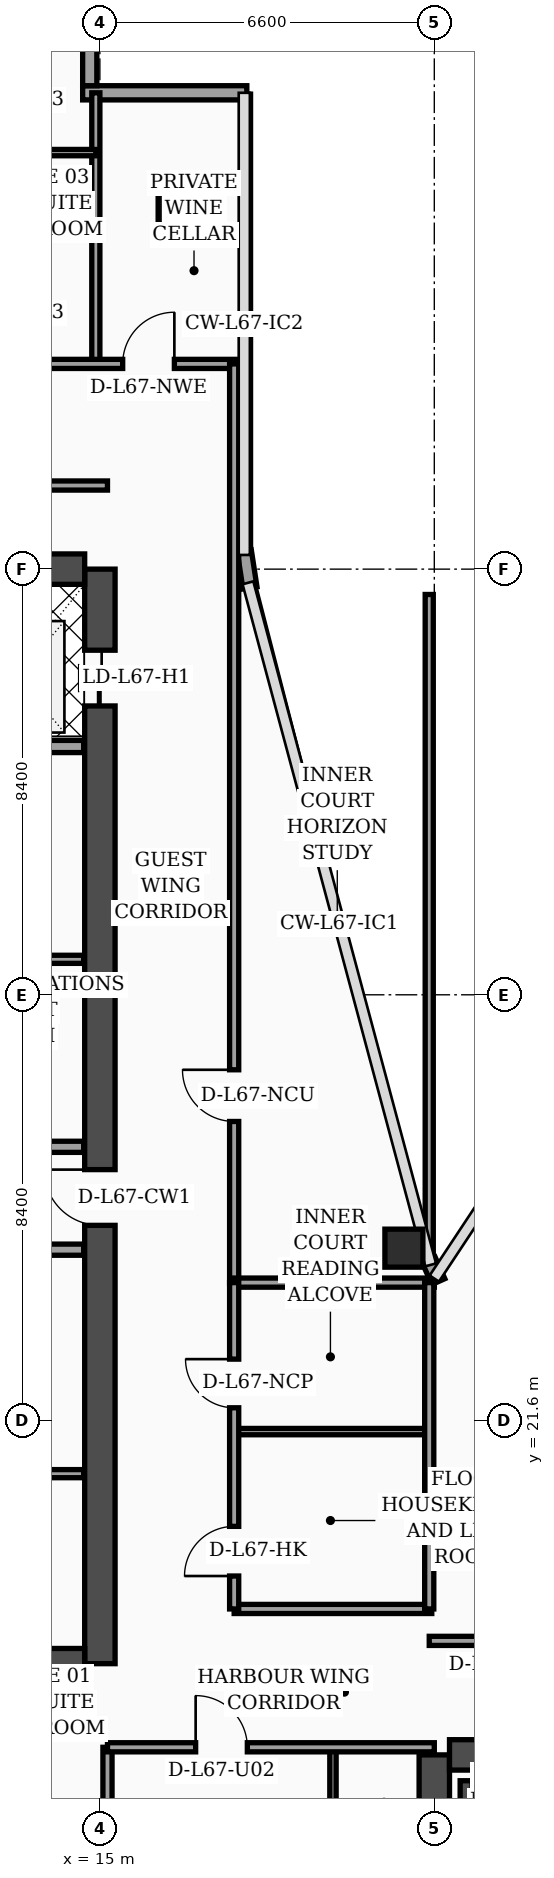
"""IFC4 building model, lengths in metres.
Left out: names, types, materials, properties, quantities, classifications, styles, units other than length and angle.
Written with IfcOpenShell. Run it as: python <this file> out.ifc"""

import sys

from ifc_helpers import new_model, si_unit, direction, frame, frame_2d, origin, origin_2d, place, context, subcontext, project, spatial, rectangle, hollow_rectangle, extrude, element, fill, save


model = new_model("IFC4")
c1 = context("Model", 3, precision=1e-05, world=origin(), true_north=direction((0.0, 1.0)))
c2 = subcontext(c1, "Body", "Model", "MODEL_VIEW")
j1 = project(units=[si_unit("LENGTHUNIT", "METRE"), si_unit("PLANEANGLEUNIT", "RADIAN")], contexts=[c1])
p1 = place(None, origin())
s1 = spatial("IfcSite", under=j1, at=p1, CompositionType="ELEMENT")
p2 = place(p1, origin())
s2 = spatial("IfcBuilding", under=s1, at=p2, CompositionType="ELEMENT")
p3 = place(p2, frame((0.0, 0.0, 271.1)))
s3 = spatial("IfcBuildingStorey", under=s2, at=p3, CompositionType="ELEMENT", Elevation=271.1)
p4 = place(p3, frame((15.0, 16.8, 0.0), z_axis=(0.0, 0.0, 1.0), x_axis=(0.0, 1.0, 0.0)))
e1 = element("IfcWall", 1, at=p4, inside=s3, PredefinedType="SHEAR", context=c2, shape_type="SweptSolid", body=[
    extrude(rectangle(XDim=21.6, YDim=0.6, at=frame_2d((10.8, 0.0))), origin(), (0.0, 0.0, 1.0), 3.56),
])
p5 = place(p4, frame((8.65, 0.0, 0.0)))
e2 = element("IfcOpeningElement", 2, at=p5, cuts=e1, PredefinedType="OPENING", context=c2, shape_type="SweptSolid", body=[
    extrude(rectangle(XDim=1.1, YDim=2.2, at=frame_2d((0.55, 1.1))), frame((0.0, 0.31, 0.0), z_axis=(0.0, -1.0, 0.0), x_axis=(1.0, 0.0, 0.0)), (0.0, 0.0, 1.0), 0.62),
])
p6 = place(p4, frame((18.9, 0.0, 0.0)))
e3 = element("IfcOpeningElement", 3, at=p6, cuts=e1, PredefinedType="OPENING", context=c2, shape_type="SweptSolid", body=[
    extrude(rectangle(XDim=1.1, YDim=2.2, at=frame_2d((0.55, 1.1))), frame((0.0, 0.31, 0.0), z_axis=(0.0, -1.0, 0.0), x_axis=(1.0, 0.0, 0.0)), (0.0, 0.0, 1.0), 0.62),
])
p7 = place(p3, frame((4.5, 38.4, 0.0), z_axis=(0.0, 0.0, 1.0), x_axis=(1.0, 0.0, 0.0)))
e4 = element("IfcWall", 4, at=p7, inside=s3, PredefinedType="SHEAR", context=c2, shape_type="SweptSolid", body=[
    extrude(rectangle(XDim=10.2, YDim=0.6, at=frame_2d((5.1, 0.0))), origin(), (0.0, 0.0, 1.0), 3.56),
])
p8 = place(p7, frame((5.8, 0.0, 0.0)))
e5 = element("IfcOpeningElement", 5, at=p8, cuts=e4, PredefinedType="OPENING", context=c2, shape_type="SweptSolid", body=[
    extrude(rectangle(XDim=1.1, YDim=2.2, at=frame_2d((0.55, 1.1))), frame((0.0, 0.31, 0.0), z_axis=(0.0, -1.0, 0.0), x_axis=(1.0, 0.0, 0.0)), (0.0, 0.0, 1.0), 0.62),
])
p9 = place(p3, frame((4.5, 16.8, 0.0), z_axis=(0.0, 0.0, 1.0), x_axis=(1.0, 0.0, 0.0)))
e6 = element("IfcWall", 6, at=p9, inside=s3, PredefinedType="SHEAR", context=c2, shape_type="SweptSolid", body=[
    extrude(rectangle(XDim=10.2, YDim=0.6, at=frame_2d((5.1, 0.0))), origin(), (0.0, 0.0, 1.0), 3.56),
])
p10 = place(p3, frame((21.6, 4.6, 0.0), z_axis=(0.0, 0.0, 1.0), x_axis=(0.0, 1.0, 0.0)))
e7 = element("IfcWall", 7, at=p10, inside=s3, PredefinedType="SHEAR", context=c2, shape_type="SweptSolid", body=[
    extrude(rectangle(XDim=10.4, YDim=0.6, at=frame_2d((5.2, 0.0))), origin(), (0.0, 0.0, 1.0), 3.56),
])
p11 = place(p3, frame((21.9, 15.0, 0.0), z_axis=(0.0, 0.0, 1.0), x_axis=(1.0, 0.0, 0.0)))
e8 = element("IfcWall", 8, at=p11, inside=s3, PredefinedType="SHEAR", context=c2, shape_type="SweptSolid", body=[
    extrude(rectangle(XDim=10.2, YDim=0.6, at=frame_2d((5.1, 0.0))), origin(), (0.0, 0.0, 1.0), 3.56),
])
p12 = place(p11, frame((5.0, 0.0, 0.0)))
e9 = element("IfcOpeningElement", 9, at=p12, cuts=e8, PredefinedType="OPENING", context=c2, shape_type="SweptSolid", body=[
    extrude(rectangle(XDim=1.1, YDim=2.2, at=frame_2d((0.55, 1.1))), frame((0.0, 0.31, 0.0), z_axis=(0.0, -1.0, 0.0), x_axis=(1.0, 0.0, 0.0)), (0.0, 0.0, 1.0), 0.62),
])
p13 = place(p3, frame((22.23, 4.9, 0.0), z_axis=(0.0, 0.0, 1.0), x_axis=(0.0, 1.0, 0.0)))
e10 = element("IfcWall", 10, at=p13, inside=s3, PredefinedType="SOLIDWALL", context=c2, shape_type="SweptSolid", body=[
    extrude(rectangle(XDim=9.59, YDim=0.24, at=frame_2d((4.795, 0.0))), origin(), (0.0, 0.0, 1.0), 3.56),
])
p14 = place(p3, frame((22.35, 14.37, 0.0), z_axis=(0.0, 0.0, 1.0), x_axis=(1.0, 0.0, 0.0)))
e11 = element("IfcWall", 11, at=p14, inside=s3, PredefinedType="SOLIDWALL", context=c2, shape_type="SweptSolid", body=[
    extrude(rectangle(XDim=3.1, YDim=0.24, at=frame_2d((1.55, 0.0))), origin(), (0.0, 0.0, 1.0), 3.56),
])
p15 = place(p3, frame((16.55, 45.6, 0.0), z_axis=(0.0, 0.0, 1.0), x_axis=(1.0, 0.0, 0.0)))
e12 = element("IfcColumn", 12, at=p15, inside=s3, PredefinedType="COLUMN", context=c2, shape_type="SweptSolid", body=[
    extrude(rectangle(XDim=0.8, YDim=0.8, at=origin_2d()), origin(), (0.0, 0.0, 1.0), 3.56),
])
p16 = place(p3, frame((21.0, 25.0, 0.0), z_axis=(0.0, 0.0, 1.0), x_axis=(1.0, 0.0, 0.0)))
e13 = element("IfcColumn", 13, at=p16, inside=s3, PredefinedType="COLUMN", context=c2, shape_type="SweptSolid", body=[
    extrude(hollow_rectangle(XDim=0.75, YDim=0.75, WallThickness=0.032, at=origin_2d()), origin(), (0.0, 0.0, 1.0), 3.56),
])
p17 = place(p3, frame((21.68, 24.34, 0.0), z_axis=(0.0, 0.0, 1.0), x_axis=(-0.40758134973, 0.913168901875, 0.0)))
e14 = element("IfcWall", 14, at=p17, inside=s3, PredefinedType="SOLIDWALL", context=c2, shape_type="SweptSolid", body=[
    extrude(rectangle(XDim=0.471, YDim=0.28, at=frame_2d((0.235, 0.0))), origin(), (0.0, 0.0, 1.0), 3.56),
])
p18 = place(p3, frame((17.962, 38.03, 0.0), z_axis=(0.0, 0.0, 1.0), x_axis=(-0.15141125477, 0.988470855377, 0.0)))
e15 = element("IfcWall", 15, at=p18, inside=s3, PredefinedType="SOLIDWALL", context=c2, shape_type="SweptSolid", body=[
    extrude(rectangle(XDim=0.739, YDim=0.28, at=frame_2d((0.369, 0.0))), origin(), (0.0, 0.0, 1.0), 3.56),
])
p19 = place(p3, frame((17.9, 47.8, 0.0), z_axis=(0.0, 0.0, 1.0), x_axis=(-1.0, 0.0, 0.0)))
e16 = element("IfcWall", 16, at=p19, inside=s3, PredefinedType="SOLIDWALL", context=c2, shape_type="SweptSolid", body=[
    extrude(rectangle(XDim=3.24, YDim=0.28, at=frame_2d((1.62, 0.0))), origin(), (0.0, 0.0, 1.0), 3.56),
])
p20 = place(p3, frame((14.8, 47.94, 0.0), z_axis=(0.0, 0.0, 1.0), x_axis=(0.0, 1.0, 0.0)))
e17 = element("IfcWall", 17, at=p20, inside=s3, PredefinedType="SOLIDWALL", context=c2, shape_type="SweptSolid", body=[
    extrude(rectangle(XDim=2.94, YDim=0.28, at=frame_2d((1.47, 0.0))), origin(), (0.0, 0.0, 1.0), 3.56),
])
p21 = place(p3, frame((9.68, 20.55, 0.0), z_axis=(0.0, 0.0, 1.0), x_axis=(1.0, 0.0, 0.0)))
e18 = element("IfcWall", 18, at=p21, inside=s3, PredefinedType="PARTITIONING", context=c2, shape_type="SweptSolid", body=[
    extrude(rectangle(XDim=5.0, YDim=0.16, at=frame_2d((2.5, 0.0))), origin(), (0.0, 0.0, 1.0), 3.56),
])
p22 = place(p21, frame((1.1, 0.0, 0.0)))
e19 = element("IfcOpeningElement", 19, at=p22, cuts=e18, PredefinedType="OPENING", context=c2, shape_type="SweptSolid", body=[
    extrude(rectangle(XDim=0.98, YDim=2.15, at=frame_2d((0.49, 1.075))), frame((0.0, 0.09, 0.0), z_axis=(0.0, -1.0, 0.0), x_axis=(1.0, 0.0, 0.0)), (0.0, 0.0, 1.0), 0.18),
])
p23 = place(p3, frame((9.68, 24.97, 0.0), z_axis=(0.0, 0.0, 1.0), x_axis=(1.0, 0.0, 0.0)))
e20 = element("IfcWall", 20, at=p23, inside=s3, PredefinedType="SOLIDWALL", context=c2, shape_type="SweptSolid", body=[
    extrude(rectangle(XDim=5.0, YDim=0.22, at=frame_2d((2.5, 0.0))), origin(), (0.0, 0.0, 1.0), 2.99),
])
p24 = place(p23, frame((0.9, 0.0, 0.0)))
e21 = element("IfcOpeningElement", 21, at=p24, cuts=e20, PredefinedType="OPENING", context=c2, shape_type="SweptSolid", body=[
    extrude(rectangle(XDim=0.98, YDim=2.15, at=frame_2d((0.49, 1.075))), frame((0.0, 0.12, 0.0), z_axis=(0.0, -1.0, 0.0), x_axis=(1.0, 0.0, 0.0)), (0.0, 0.0, 1.0), 0.24),
])
p25 = place(p3, frame((12.25, 27.0, 0.0), z_axis=(0.0, 0.0, 1.0), x_axis=(1.0, 0.0, 0.0)))
e22 = element("IfcWall", 22, at=p25, inside=s3, PredefinedType="SOLIDWALL", context=c2, shape_type="SweptSolid", body=[
    extrude(rectangle(XDim=2.43, YDim=0.22, at=frame_2d((1.215, 0.0))), origin(), (0.0, 0.0, 1.0), 3.56),
])
p26 = place(p3, frame((12.25, 30.7, 0.0), z_axis=(0.0, 0.0, 1.0), x_axis=(1.0, 0.0, 0.0)))
e23 = element("IfcWall", 23, at=p26, inside=s3, PredefinedType="PARTITIONING", context=c2, shape_type="SweptSolid", body=[
    extrude(rectangle(XDim=2.43, YDim=0.16, at=frame_2d((1.215, 0.0))), origin(), (0.0, 0.0, 1.0), 3.56),
])
p27 = place(p26, frame((0.55, 0.0, 0.0)))
e24 = element("IfcOpeningElement", 24, at=p27, cuts=e23, PredefinedType="OPENING", context=c2, shape_type="SweptSolid", body=[
    extrude(rectangle(XDim=0.98, YDim=2.15, at=frame_2d((0.49, 1.075))), frame((0.0, 0.09, 0.0), z_axis=(0.0, -1.0, 0.0), x_axis=(1.0, 0.0, 0.0)), (0.0, 0.0, 1.0), 0.18),
])
p28 = place(p3, frame((9.66, 34.9, 0.0), z_axis=(0.0, 0.0, 1.0), x_axis=(1.0, 0.0, 0.0)))
e25 = element("IfcWall", 25, at=p28, inside=s3, PredefinedType="SOLIDWALL", context=c2, shape_type="SweptSolid", body=[
    extrude(rectangle(XDim=5.02, YDim=0.24, at=frame_2d((2.51, 0.0))), origin(), (0.0, 0.0, 1.0), 3.56),
])
p29 = place(p3, frame((15.15, 2.44, 0.0), z_axis=(0.0, 0.0, 1.0), x_axis=(0.0, 1.0, 0.0)))
e26 = element("IfcWall", 26, at=p29, inside=s3, PredefinedType="PARTITIONING", context=c2, shape_type="SweptSolid", body=[
    extrude(rectangle(XDim=12.71, YDim=0.18, at=frame_2d((6.355, 0.0))), origin(), (0.0, 0.0, 1.0), 3.09),
])
p30 = place(p3, frame((19.6, 2.44, 0.0), z_axis=(0.0, 0.0, 1.0), x_axis=(0.0, 1.0, 0.0)))
e27 = element("IfcWall", 27, at=p30, inside=s3, PredefinedType="PARTITIONING", context=c2, shape_type="SweptSolid", body=[
    extrude(rectangle(XDim=12.71, YDim=0.125, at=frame_2d((6.355, 0.0))), origin(), (0.0, 0.0, 1.0), 2.59),
])
p31 = place(p30, frame((4.34, 0.0, 0.0)))
e28 = element("IfcOpeningElement", 28, at=p31, cuts=e27, PredefinedType="OPENING", context=c2, shape_type="SweptSolid", body=[
    extrude(rectangle(XDim=0.96, YDim=2.2, at=frame_2d((0.48, 1.1))), frame((0.0, 0.073, 0.0), z_axis=(0.0, -1.0, 0.0), x_axis=(1.0, 0.0, 0.0)), (0.0, 0.0, 1.0), 0.145),
])
p32 = place(p30, frame((10.18, 0.0, 0.0)))
e29 = element("IfcOpeningElement", 29, at=p32, cuts=e27, PredefinedType="OPENING", context=c2, shape_type="SweptSolid", body=[
    extrude(rectangle(XDim=0.9, YDim=2.15, at=frame_2d((0.45, 1.075))), frame((0.0, 0.073, 0.0), z_axis=(0.0, -1.0, 0.0), x_axis=(1.0, 0.0, 0.0)), (0.0, 0.0, 1.0), 0.145),
])
p33 = place(p3, frame((15.15, 15.15, 0.0), z_axis=(0.0, 0.0, 1.0), x_axis=(1.0, 0.0, 0.0)))
e30 = element("IfcWall", 30, at=p33, inside=s3, PredefinedType="PARTITIONING", context=c2, shape_type="SweptSolid", body=[
    extrude(rectangle(XDim=6.45, YDim=0.18, at=frame_2d((3.225, 0.0))), origin(), (0.0, 0.0, 1.0), 2.59),
])
p34 = place(p33, frame((1.74, 0.0, 0.0)))
e31 = element("IfcOpeningElement", 31, at=p34, cuts=e30, PredefinedType="OPENING", context=c2, shape_type="SweptSolid", body=[
    extrude(rectangle(XDim=1.02, YDim=2.2, at=frame_2d((0.51, 1.1))), frame((0.0, 0.1, 0.0), z_axis=(0.0, -1.0, 0.0), x_axis=(1.0, 0.0, 0.0)), (0.0, 0.0, 1.0), 0.2),
])
p35 = place(p3, frame((14.92, 42.45, 0.0), z_axis=(0.0, 0.0, 1.0), x_axis=(0.0, 1.0, 0.0)))
e32 = element("IfcWall", 32, at=p35, inside=s3, PredefinedType="PARTITIONING", context=c2, shape_type="SweptSolid", body=[
    extrude(rectangle(XDim=5.35, YDim=0.16, at=frame_2d((2.675, 0.0))), origin(), (0.0, 0.0, 1.0), 3.09),
])
p36 = place(p3, frame((12.79, 46.62, 0.0), z_axis=(0.0, 0.0, 1.0), x_axis=(1.0, 0.0, 0.0)))
e33 = element("IfcWall", 33, at=p36, inside=s3, PredefinedType="PARTITIONING", context=c2, shape_type="SweptSolid", body=[
    extrude(rectangle(XDim=2.13, YDim=0.125, at=frame_2d((1.065, 0.0))), origin(), (0.0, 0.0, 1.0), 3.09),
])
p37 = place(p3, frame((0.08, 42.45, 0.0), z_axis=(0.0, 0.0, 1.0), x_axis=(1.0, 0.0, 0.0)))
e34 = element("IfcWall", 34, at=p37, inside=s3, PredefinedType="PARTITIONING", context=c2, shape_type="SweptSolid", body=[
    extrude(rectangle(XDim=17.77, YDim=0.18, at=frame_2d((8.885, 0.0))), origin(), (0.0, 0.0, 1.0), 2.99),
])
p38 = place(p37, frame((0.9, 0.0, 0.0)))
e35 = element("IfcOpeningElement", 35, at=p38, cuts=e34, PredefinedType="OPENING", context=c2, shape_type="SweptSolid", body=[
    extrude(rectangle(XDim=1.02, YDim=2.2, at=frame_2d((0.51, 1.1))), frame((0.0, 0.1, 0.0), z_axis=(0.0, -1.0, 0.0), x_axis=(1.0, 0.0, 0.0)), (0.0, 0.0, 1.0), 0.2),
])
p39 = place(p37, frame((7.38, 0.0, 0.0)))
e36 = element("IfcOpeningElement", 36, at=p39, cuts=e34, PredefinedType="OPENING", context=c2, shape_type="SweptSolid", body=[
    extrude(rectangle(XDim=1.02, YDim=2.2, at=frame_2d((0.51, 1.1))), frame((0.0, 0.1, 0.0), z_axis=(0.0, -1.0, 0.0), x_axis=(1.0, 0.0, 0.0)), (0.0, 0.0, 1.0), 0.2),
])
p40 = place(p37, frame((15.37, 0.0, 0.0)))
e37 = element("IfcOpeningElement", 37, at=p40, cuts=e34, PredefinedType="OPENING", context=c2, shape_type="SweptSolid", body=[
    extrude(rectangle(XDim=1.02, YDim=2.2, at=frame_2d((0.51, 1.1))), frame((0.0, 0.1, 0.0), z_axis=(0.0, -1.0, 0.0), x_axis=(1.0, 0.0, 0.0)), (0.0, 0.0, 1.0), 0.2),
])
p41 = place(p3, frame((17.65, 24.3, 0.0), z_axis=(0.0, 0.0, 1.0), x_axis=(0.0, 1.0, 0.0)))
e38 = element("IfcWall", 38, at=p41, inside=s3, PredefinedType="PARTITIONING", context=c2, shape_type="SweptSolid", body=[
    extrude(rectangle(XDim=18.15, YDim=0.18, at=frame_2d((9.075, 0.0))), origin(), (0.0, 0.0, 1.0), 2.99),
])
p42 = place(p41, frame((3.2, 0.0, 0.0)))
e39 = element("IfcOpeningElement", 39, at=p42, cuts=e38, PredefinedType="OPENING", context=c2, shape_type="SweptSolid", body=[
    extrude(rectangle(XDim=1.02, YDim=2.2, at=frame_2d((0.51, 1.1))), frame((0.0, 0.1, 0.0), z_axis=(0.0, -1.0, 0.0), x_axis=(1.0, 0.0, 0.0)), (0.0, 0.0, 1.0), 0.2),
])
p43 = place(p3, frame((3.88, 40.05, 0.0), z_axis=(0.0, 0.0, 1.0), x_axis=(1.0, 0.0, 0.0)))
e40 = element("IfcWall", 40, at=p43, inside=s3, PredefinedType="PARTITIONING", context=c2, shape_type="SweptSolid", body=[
    extrude(rectangle(XDim=11.27, YDim=0.18, at=frame_2d((5.635, 0.0))), origin(), (0.0, 0.0, 1.0), 2.99),
])
p44 = place(p3, frame((17.65, 17.88, 0.0), z_axis=(0.0, 0.0, 1.0), x_axis=(1.0, 0.0, 0.0)))
e41 = element("IfcWall", 41, at=p44, inside=s3, PredefinedType="PARTITIONING", context=c2, shape_type="SweptSolid", body=[
    extrude(rectangle(XDim=3.9, YDim=0.18, at=frame_2d((1.95, 0.0))), origin(), (0.0, 0.0, 1.0), 3.09),
])
p45 = place(p3, frame((17.65, 21.38, 0.0), z_axis=(0.0, 0.0, 1.0), x_axis=(1.0, 0.0, 0.0)))
e42 = element("IfcWall", 42, at=p45, inside=s3, PredefinedType="PARTITIONING", context=c2, shape_type="SweptSolid", body=[
    extrude(rectangle(XDim=3.9, YDim=0.125, at=frame_2d((1.95, 0.0))), origin(), (0.0, 0.0, 1.0), 3.56),
])
p46 = place(p3, frame((17.65, 24.32, 0.0), z_axis=(0.0, 0.0, 1.0), x_axis=(1.0, 0.0, 0.0)))
e43 = element("IfcWall", 43, at=p46, inside=s3, PredefinedType="PARTITIONING", context=c2, shape_type="SweptSolid", body=[
    extrude(rectangle(XDim=3.95, YDim=0.18, at=frame_2d((1.975, 0.0))), origin(), (0.0, 0.0, 1.0), 3.56),
])
p47 = place(p3, frame((21.5, 17.88, 0.0), z_axis=(0.0, 0.0, 1.0), x_axis=(0.0, 1.0, 0.0)))
e44 = element("IfcWall", 44, at=p47, inside=s3, PredefinedType="PARTITIONING", context=c2, shape_type="SweptSolid", body=[
    extrude(rectangle(XDim=6.44, YDim=0.18, at=frame_2d((3.22, 0.0))), origin(), (0.0, 0.0, 1.0), 3.09),
])
p48 = place(p3, frame((17.65, 17.88, 0.0), z_axis=(0.0, 0.0, 1.0), x_axis=(0.0, 1.0, 0.0)))
e45 = element("IfcWall", 45, at=p48, inside=s3, PredefinedType="PARTITIONING", context=c2, shape_type="SweptSolid", body=[
    extrude(rectangle(XDim=6.44, YDim=0.18, at=frame_2d((3.22, 0.0))), origin(), (0.0, 0.0, 1.0), 3.09),
])
p49 = place(p48, frame((0.65, 0.0, 0.0)))
e46 = element("IfcOpeningElement", 46, at=p49, cuts=e45, PredefinedType="OPENING", context=c2, shape_type="SweptSolid", body=[
    extrude(rectangle(XDim=0.98, YDim=2.15, at=frame_2d((0.49, 1.075))), frame((0.0, 0.1, 0.0), z_axis=(0.0, -1.0, 0.0), x_axis=(1.0, 0.0, 0.0)), (0.0, 0.0, 1.0), 0.2),
])
p50 = place(p48, frame((3.97, 0.0, 0.0)))
e47 = element("IfcOpeningElement", 47, at=p50, cuts=e45, PredefinedType="OPENING", context=c2, shape_type="SweptSolid", body=[
    extrude(rectangle(XDim=0.96, YDim=2.2, at=frame_2d((0.48, 1.1))), frame((0.0, 0.1, 0.0), z_axis=(0.0, -1.0, 0.0), x_axis=(1.0, 0.0, 0.0)), (0.0, 0.0, 1.0), 0.2),
])
p51 = place(p3, frame((21.5, 24.85, 0.0), z_axis=(0.0, 0.0, 1.0), x_axis=(0.0, 1.0, 0.0)))
e48 = element("IfcWall", 48, at=p51, inside=s3, PredefinedType="PARTITIONING", context=c2, shape_type="SweptSolid", body=[
    extrude(rectangle(XDim=13.05, YDim=0.16, at=frame_2d((6.525, 0.0))), origin(), (0.0, 0.0, 1.0), 2.99),
])
p52 = place(p3, frame((21.5, 17.25, 0.0), z_axis=(0.0, 0.0, 1.0), x_axis=(1.0, 0.0, 0.0)))
e49 = element("IfcWall", 49, at=p52, inside=s3, PredefinedType="PARTITIONING", context=c2, shape_type="SweptSolid", body=[
    extrude(rectangle(XDim=6.9, YDim=0.18, at=frame_2d((3.45, 0.0))), origin(), (0.0, 0.0, 1.0), 3.56),
])
p53 = place(p52, frame((0.95, 0.0, 0.0)))
e50 = element("IfcOpeningElement", 50, at=p53, cuts=e49, PredefinedType="OPENING", context=c2, shape_type="SweptSolid", body=[
    extrude(rectangle(XDim=1.02, YDim=2.2, at=frame_2d((0.51, 1.1))), frame((0.0, 0.1, 0.0), z_axis=(0.0, -1.0, 0.0), x_axis=(1.0, 0.0, 0.0)), (0.0, 0.0, 1.0), 0.2),
])
p54 = place(p34, origin())
e51 = element("IfcDoor", 51, at=p54, inside=s3, OperationType="SINGLE_SWING_LEFT", PredefinedType="DOOR", context=c2, shape_type="SweptSolid", body=[
    extrude(rectangle(XDim=1.02, YDim=2.2, at=frame_2d((0.51, 1.1))), frame((0.0, 0.025, 0.0), z_axis=(0.0, -1.0, 0.0), x_axis=(1.0, 0.0, 0.0)), (0.0, 0.0, 1.0), 0.05),
])
fill(e31, e51)
p55 = place(p40, origin())
e52 = element("IfcDoor", 52, at=p55, inside=s3, OperationType="SINGLE_SWING_RIGHT", PredefinedType="DOOR", context=c2, shape_type="SweptSolid", body=[
    extrude(rectangle(XDim=1.02, YDim=2.2, at=frame_2d((0.51, 1.1))), frame((0.0, 0.025, 0.0), z_axis=(0.0, -1.0, 0.0), x_axis=(1.0, 0.0, 0.0)), (0.0, 0.0, 1.0), 0.05),
])
fill(e37, e52)
p56 = place(p42, origin())
e53 = element("IfcDoor", 53, at=p56, inside=s3, OperationType="SINGLE_SWING_RIGHT", PredefinedType="DOOR", context=c2, shape_type="SweptSolid", body=[
    extrude(rectangle(XDim=1.02, YDim=2.2, at=frame_2d((0.51, 1.1))), frame((0.0, 0.025, 0.0), z_axis=(0.0, -1.0, 0.0), x_axis=(1.0, 0.0, 0.0)), (0.0, 0.0, 1.0), 0.05),
])
fill(e39, e53)
p57 = place(p49, origin())
e54 = element("IfcDoor", 54, at=p57, inside=s3, OperationType="SINGLE_SWING_LEFT", PredefinedType="DOOR", context=c2, shape_type="SweptSolid", body=[
    extrude(rectangle(XDim=0.98, YDim=2.15, at=frame_2d((0.49, 1.075))), frame((0.0, 0.025, 0.0), z_axis=(0.0, -1.0, 0.0), x_axis=(1.0, 0.0, 0.0)), (0.0, 0.0, 1.0), 0.05),
])
fill(e46, e54)
p58 = place(p50, origin())
e55 = element("IfcDoor", 55, at=p58, inside=s3, OperationType="SINGLE_SWING_RIGHT", PredefinedType="DOOR", context=c2, shape_type="SweptSolid", body=[
    extrude(rectangle(XDim=0.96, YDim=2.2, at=frame_2d((0.48, 1.1))), frame((0.0, 0.025, 0.0), z_axis=(0.0, -1.0, 0.0), x_axis=(1.0, 0.0, 0.0)), (0.0, 0.0, 1.0), 0.05),
])
fill(e47, e55)
p59 = place(p5, origin())
e56 = element("IfcDoor", 56, at=p59, inside=s3, OperationType="SINGLE_SWING_RIGHT", PredefinedType="DOOR", context=c2, shape_type="SweptSolid", body=[
    extrude(rectangle(XDim=1.1, YDim=2.2, at=frame_2d((0.55, 1.1))), frame((0.0, 0.025, 0.0), z_axis=(0.0, -1.0, 0.0), x_axis=(1.0, 0.0, 0.0)), (0.0, 0.0, 1.0), 0.05),
])
fill(e2, e56)
p60 = place(p6, origin())
e57 = element("IfcDoor", 57, at=p60, inside=s3, OperationType="DOUBLE_DOOR_SLIDING", PredefinedType="DOOR", context=c2, shape_type="SweptSolid", body=[
    extrude(rectangle(XDim=1.1, YDim=2.2, at=frame_2d((0.55, 1.1))), frame((0.0, 0.025, 0.0), z_axis=(0.0, -1.0, 0.0), x_axis=(1.0, 0.0, 0.0)), (0.0, 0.0, 1.0), 0.05),
])
fill(e3, e57)
save(model, sys.argv[1])
